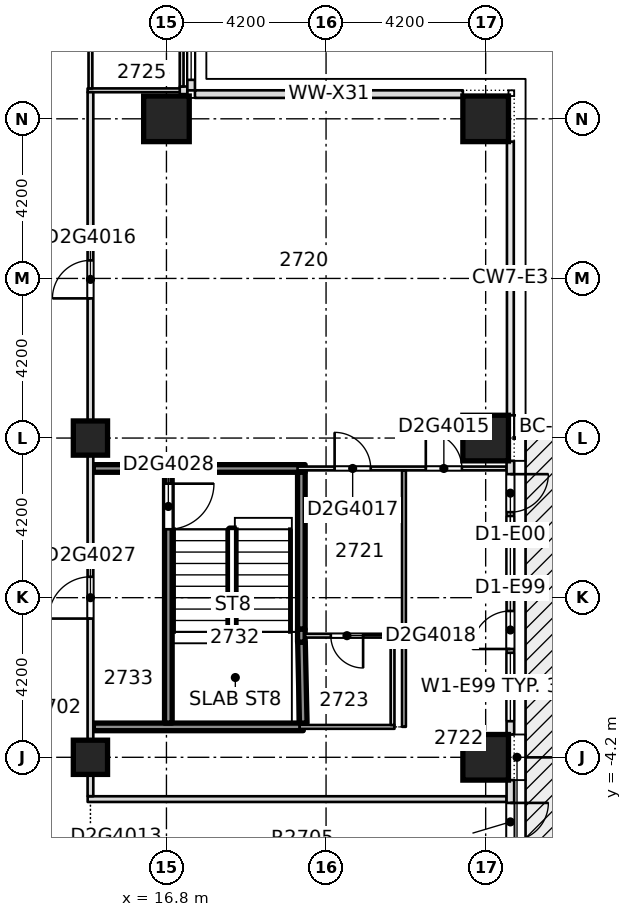
"""IFC4 building model, lengths in metres.
Left out: names, types, materials, properties, quantities, classifications, styles, units other than length and angle.
Written with IfcOpenShell. Run it as: python <this file> out.ifc"""

import sys

from ifc_helpers import new_model, si_unit, direction, frame, frame_2d, origin, origin_2d, place, context, subcontext, project, spatial, rectangle, extrude, element, fill, save


model = new_model("IFC4")
c1 = context("Model", 3, precision=1e-05, world=origin(), true_north=direction((0.0, 1.0)))
c2 = subcontext(c1, "Body", "Model", "MODEL_VIEW")
j1 = project(units=[si_unit("LENGTHUNIT", "METRE"), si_unit("PLANEANGLEUNIT", "RADIAN")], contexts=[c1])
p1 = place(None, origin())
s1 = spatial("IfcSite", under=j1, at=p1, CompositionType="ELEMENT")
p2 = place(p1, origin())
s2 = spatial("IfcBuilding", under=s1, at=p2, CompositionType="ELEMENT")
p3 = place(p2, frame((0.0, 0.0, 108.0)))
s3 = spatial("IfcBuildingStorey", under=s2, at=p3, CompositionType="ELEMENT", Elevation=108.0)
for number, where, z_axis, x_axis in (
    (1, (25.2, -4.2, -0.32), (0.0, 0.0, 1.0), (1.0, 0.0, 0.0)),
    (2, (25.2, 4.2, -0.32), (0.0, 0.0, 1.0), (1.0, 0.0, 0.0)),
    (3, (16.8, 12.6, -0.32), (0.0, 0.0, 1.0), (1.0, 0.0, 0.0)),
    (4, (25.2, 12.6, -0.32), (0.0, 0.0, 1.0), (1.0, 0.0, 0.0)),
):
    element("IfcColumn", number, at=place(p3, frame(where, z_axis=z_axis, x_axis=x_axis)), inside=s3, PredefinedType="COLUMN", context=c2, shape_type="SweptSolid", body=[
        extrude(rectangle(XDim=1.2, YDim=1.2, at=origin_2d()), origin(), (0.0, 0.0, 1.0), 3.45),
    ])
for number, where, z_axis, x_axis in (
    (5, (14.8, -4.2, -0.32), (0.0, 0.0, 1.0), (1.0, 0.0, 0.0)),
    (6, (14.8, 4.2, -0.32), (0.0, 0.0, 1.0), (1.0, 0.0, 0.0)),
):
    element("IfcColumn", number, at=place(p3, frame(where, z_axis=z_axis, x_axis=x_axis)), inside=s3, PredefinedType="COLUMN", context=c2, shape_type="SweptSolid", body=[
        extrude(rectangle(XDim=0.9, YDim=0.9, at=origin_2d()), origin(), (0.0, 0.0, 1.0), 3.45),
    ])
p4 = place(p3, frame((14.727, -5.3, 0.0), z_axis=(0.0, 0.0, 1.0), x_axis=(1.0, 0.0, 0.0)))
e7 = element("IfcWall", 7, at=p4, inside=s3, PredefinedType="PARTITIONING", context=c2, shape_type="SweptSolid", body=[
    extrude(rectangle(XDim=11.023, YDim=0.15, at=frame_2d((5.511, 0.0))), origin(), (0.0, 0.0, 1.0), 3.13),
])
p5 = place(p3, frame((14.877, -3.4, 0.0), z_axis=(0.0, 0.0, 1.0), x_axis=(1.0, 0.0, 0.0)))
e8 = element("IfcWall", 8, at=p5, inside=s3, PredefinedType="SOLIDWALL", context=c2, shape_type="SweptSolid", body=[
    extrude(rectangle(XDim=5.523, YDim=0.2, at=frame_2d((2.761, 0.0))), origin(), (0.0, 0.0, 1.0), 3.13),
])
p6 = place(p3, frame((20.3, -3.4, 0.0), z_axis=(0.0, 0.0, 1.0), x_axis=(1.0, 0.0, 0.0)))
e9 = element("IfcWall", 9, at=p6, inside=s3, PredefinedType="PARTITIONING", context=c2, shape_type="SweptSolid", body=[
    extrude(rectangle(XDim=2.5, YDim=0.1, at=frame_2d((1.25, 0.0))), origin(), (0.0, 0.0, 1.0), 3.13),
])
p7 = place(p3, frame((20.45, -1.0, 0.0), z_axis=(0.0, 0.0, 1.0), x_axis=(1.0, 0.0, 0.0)))
e10 = element("IfcWall", 10, at=p7, inside=s3, PredefinedType="PARTITIONING", context=c2, shape_type="SweptSolid", body=[
    extrude(rectangle(XDim=2.35, YDim=0.1, at=frame_2d((1.175, 0.0))), origin(), (0.0, 0.0, 1.0), 3.13),
])
p8 = place(p7, frame((0.675, 0.0, 0.0)))
e11 = element("IfcOpeningElement", 11, at=p8, cuts=e10, PredefinedType="OPENING", context=c2, shape_type="SweptSolid", body=[
    extrude(rectangle(XDim=0.85, YDim=2.1, at=frame_2d((0.425, 1.05))), frame((0.0, 0.06, 0.0), z_axis=(0.0, -1.0, 0.0), x_axis=(1.0, 0.0, 0.0)), (0.0, 0.0, 1.0), 0.12),
])
p9 = place(p3, frame((14.875, 3.4, 0.0), z_axis=(0.0, 0.0, 1.0), x_axis=(1.0, 0.0, 0.0)))
e12 = element("IfcWall", 12, at=p9, inside=s3, PredefinedType="SOLIDWALL", context=c2, shape_type="SweptSolid", body=[
    extrude(rectangle(XDim=5.575, YDim=0.2, at=frame_2d((2.788, 0.0))), origin(), (0.0, 0.0, 1.0), 3.13),
])
p10 = place(p3, frame((20.25, 3.4, 0.0), z_axis=(0.0, 0.0, 1.0), x_axis=(1.0, 0.0, 0.0)))
e13 = element("IfcWall", 13, at=p10, inside=s3, PredefinedType="PARTITIONING", context=c2, shape_type="SweptSolid", body=[
    extrude(rectangle(XDim=5.5, YDim=0.1, at=frame_2d((2.75, 0.0))), origin(), (0.0, 0.0, 1.0), 3.13),
])
p11 = place(p10, frame((3.375, 0.0, 0.0)))
e14 = element("IfcOpeningElement", 14, at=p11, cuts=e13, PredefinedType="OPENING", context=c2, shape_type="SweptSolid", body=[
    extrude(rectangle(XDim=0.95, YDim=2.1, at=frame_2d((0.475, 1.05))), frame((0.0, 0.06, 0.0), z_axis=(0.0, -1.0, 0.0), x_axis=(1.0, 0.0, 0.0)), (0.0, 0.0, 1.0), 0.12),
])
p12 = place(p10, frame((0.975, 0.0, 0.0)))
e15 = element("IfcOpeningElement", 15, at=p12, cuts=e13, PredefinedType="OPENING", context=c2, shape_type="SweptSolid", body=[
    extrude(rectangle(XDim=0.95, YDim=2.1, at=frame_2d((0.475, 1.05))), frame((0.0, 0.06, 0.0), z_axis=(0.0, -1.0, 0.0), x_axis=(1.0, 0.0, 0.0)), (0.0, 0.0, 1.0), 0.12),
])
p13 = place(p3, frame((14.725, 13.35, 0.0), z_axis=(0.0, 0.0, 1.0), x_axis=(1.0, 0.0, 0.0)))
e16 = element("IfcWall", 16, at=p13, inside=s3, PredefinedType="PARTITIONING", context=c2, shape_type="SweptSolid", body=[
    extrude(rectangle(XDim=2.525, YDim=0.1, at=frame_2d((1.262, 0.0))), origin(), (0.0, 0.0, 1.0), 3.13),
])
p14 = place(p3, frame((17.15, 13.35, 0.0), z_axis=(0.0, 0.0, 1.0), x_axis=(1.0, 0.0, 0.0)))
e17 = element("IfcWall", 17, at=p14, inside=s3, PredefinedType="PARTITIONING", context=c2, shape_type="SweptSolid", body=[
    extrude(rectangle(XDim=0.2, YDim=0.2, at=frame_2d((0.1, 0.0))), origin(), (0.0, 0.0, 1.0), 3.13),
])
p15 = place(p3, frame((14.8, -5.223, 0.0), z_axis=(0.0, 0.0, 1.0), x_axis=(0.0, 1.0, 0.0)))
e18 = element("IfcWall", 18, at=p15, inside=s3, PredefinedType="PARTITIONING", context=c2, shape_type="SweptSolid", body=[
    extrude(rectangle(XDim=18.523, YDim=0.15, at=frame_2d((9.261, 0.0))), origin(), (0.0, 0.0, 1.0), 3.13),
])
p16 = place(p15, frame((13.098, 0.0, 0.0)))
e19 = element("IfcOpeningElement", 19, at=p16, cuts=e18, PredefinedType="OPENING", context=c2, shape_type="SweptSolid", body=[
    extrude(rectangle(XDim=1.0, YDim=2.1, at=frame_2d((0.5, 1.05))), frame((0.0, 0.085, 0.0), z_axis=(0.0, -1.0, 0.0), x_axis=(1.0, 0.0, 0.0)), (0.0, 0.0, 1.0), 0.17),
])
p17 = place(p15, frame((4.673, 0.0, 0.0)))
e20 = element("IfcOpeningElement", 20, at=p17, cuts=e18, PredefinedType="OPENING", context=c2, shape_type="SweptSolid", body=[
    extrude(rectangle(XDim=1.1, YDim=2.1, at=frame_2d((0.55, 1.05))), frame((0.0, 0.085, 0.0), z_axis=(0.0, -1.0, 0.0), x_axis=(1.0, 0.0, 0.0)), (0.0, 0.0, 1.0), 0.17),
])
p18 = place(p3, frame((14.8, 13.4, 0.0), z_axis=(0.0, 0.0, 1.0), x_axis=(0.0, 1.0, 0.0)))
e21 = element("IfcWall", 21, at=p18, inside=s3, PredefinedType="PARTITIONING", context=c2, shape_type="SweptSolid", body=[
    extrude(rectangle(XDim=1.7, YDim=0.1, at=frame_2d((0.85, 0.0))), origin(), (0.0, 0.0, 1.0), 3.13),
])
p19 = place(p3, frame((16.85, -3.3, 0.0), z_axis=(0.0, 0.0, 1.0), x_axis=(0.0, 1.0, 0.0)))
e22 = element("IfcWall", 22, at=p19, inside=s3, PredefinedType="SOLIDWALL", context=c2, shape_type="SweptSolid", body=[
    extrude(rectangle(XDim=6.6, YDim=0.2, at=frame_2d((3.3, 0.0))), origin(), (0.0, 0.0, 1.0), 3.13),
])
p20 = place(p19, frame((5.1, 0.0, 0.0)))
e23 = element("IfcOpeningElement", 23, at=p20, cuts=e22, PredefinedType="OPENING", context=c2, shape_type="SweptSolid", body=[
    extrude(rectangle(XDim=1.2, YDim=2.1, at=frame_2d((0.6, 1.05))), frame((0.0, 0.11, 0.0), z_axis=(0.0, -1.0, 0.0), x_axis=(1.0, 0.0, 0.0)), (0.0, 0.0, 1.0), 0.22),
])
p21 = place(p3, frame((17.2, 13.45, 0.0), z_axis=(0.0, 0.0, 1.0), x_axis=(0.0, 1.0, 0.0)))
e24 = element("IfcWall", 24, at=p21, inside=s3, PredefinedType="PARTITIONING", context=c2, shape_type="SweptSolid", body=[
    extrude(rectangle(XDim=1.65, YDim=0.1, at=frame_2d((0.825, 0.0))), origin(), (0.0, 0.0, 1.0), 3.13),
])
p22 = place(p3, frame((20.4, -3.3, 0.0), z_axis=(0.0, 0.0, 1.0), x_axis=(-0.021771342749, 0.999762976227, 0.0)))
e25 = element("IfcWall", 25, at=p22, inside=s3, PredefinedType="SOLIDWALL", context=c2, shape_type="SweptSolid", body=[
    extrude(rectangle(XDim=2.131, YDim=0.2, at=frame_2d((1.065, 0.0))), origin(), (0.0, 0.0, 1.0), 3.13),
])
p23 = place(p3, frame((20.35, -0.83, 0.0), z_axis=(0.0, 0.0, 1.0), x_axis=(0.0, 1.0, 0.0)))
e26 = element("IfcWall", 26, at=p23, inside=s3, PredefinedType="SOLIDWALL", context=c2, shape_type="SweptSolid", body=[
    extrude(rectangle(XDim=4.13, YDim=0.2, at=frame_2d((2.065, 0.0))), origin(), (0.0, 0.0, 1.0), 3.13),
])
p24 = place(p3, frame((22.75, -3.35, 0.0), z_axis=(0.0, 0.0, 1.0), x_axis=(0.0, 1.0, 0.0)))
e27 = element("IfcWall", 27, at=p24, inside=s3, PredefinedType="PARTITIONING", context=c2, shape_type="SweptSolid", body=[
    extrude(rectangle(XDim=2.3, YDim=0.1, at=frame_2d((1.15, 0.0))), origin(), (0.0, 0.0, 1.0), 3.13),
])
p25 = place(p3, frame((23.05, -3.398, 0.0), z_axis=(0.0, 0.0, 1.0), x_axis=(0.0, 1.0, 0.0)))
e28 = element("IfcWall", 28, at=p25, inside=s3, PredefinedType="PARTITIONING", context=c2, shape_type="SweptSolid", body=[
    extrude(rectangle(XDim=6.748, YDim=0.1, at=frame_2d((3.374, 0.0))), origin(), (0.0, 0.0, 1.0), 3.13),
])
p26 = place(p3, frame((25.85, -12.0, 0.0), z_axis=(0.0, 0.0, 1.0), x_axis=(0.0, 1.0, 0.0)))
e29 = element("IfcWall", 29, at=p26, inside=s3, PredefinedType="STANDARD", context=c2, shape_type="SweptSolid", body=[
    extrude(rectangle(XDim=7.2, YDim=0.2, at=frame_2d((3.6, 0.0))), origin(), (0.0, 0.0, 1.0), 3.13),
])
p27 = place(p26, frame((0.35, 0.0, 0.2)))
e30 = element("IfcOpeningElement", 30, at=p27, cuts=e29, PredefinedType="OPENING", context=c2, shape_type="SweptSolid", body=[
    extrude(rectangle(XDim=1.8, YDim=2.65, at=frame_2d((0.9, 1.325))), frame((0.0, 0.11, 0.0), z_axis=(0.0, -1.0, 0.0), x_axis=(1.0, 0.0, 0.0)), (0.0, 0.0, 1.0), 0.22),
])
p28 = place(p26, frame((2.25, 0.0, 0.0)))
e31 = element("IfcOpeningElement", 31, at=p28, cuts=e29, PredefinedType="OPENING", context=c2, shape_type="SweptSolid", body=[
    extrude(rectangle(XDim=1.0, YDim=2.4, at=frame_2d((0.5, 1.2))), frame((0.0, 0.11, 0.0), z_axis=(0.0, -1.0, 0.0), x_axis=(1.0, 0.0, 0.0)), (0.0, 0.0, 1.0), 0.22),
])
p29 = place(p26, frame((5.6, 0.0, 0.0)))
e32 = element("IfcOpeningElement", 32, at=p29, cuts=e29, PredefinedType="OPENING", context=c2, shape_type="SweptSolid", body=[
    extrude(rectangle(XDim=1.0, YDim=2.4, at=frame_2d((0.5, 1.2))), frame((0.0, 0.11, 0.0), z_axis=(0.0, -1.0, 0.0), x_axis=(1.0, 0.0, 0.0)), (0.0, 0.0, 1.0), 0.22),
])
p30 = place(p3, frame((25.85, -3.6, 0.0), z_axis=(0.0, 0.0, 1.0), x_axis=(0.0, 1.0, 0.0)))
e33 = element("IfcWall", 33, at=p30, inside=s3, PredefinedType="STANDARD", context=c2, shape_type="SweptSolid", body=[
    extrude(rectangle(XDim=7.2, YDim=0.2, at=frame_2d((3.6, 0.0))), origin(), (0.0, 0.0, 1.0), 3.13),
])
p31 = place(p30, frame((0.35, 0.0, 0.2)))
e34 = element("IfcOpeningElement", 34, at=p31, cuts=e33, PredefinedType="OPENING", context=c2, shape_type="SweptSolid", body=[
    extrude(rectangle(XDim=1.8, YDim=2.65, at=frame_2d((0.9, 1.325))), frame((0.0, 0.11, 0.0), z_axis=(0.0, -1.0, 0.0), x_axis=(1.0, 0.0, 0.0)), (0.0, 0.0, 1.0), 0.22),
])
p32 = place(p30, frame((2.25, 0.0, 0.0)))
e35 = element("IfcOpeningElement", 35, at=p32, cuts=e33, PredefinedType="OPENING", context=c2, shape_type="SweptSolid", body=[
    extrude(rectangle(XDim=1.0, YDim=2.4, at=frame_2d((0.5, 1.2))), frame((0.0, 0.11, 0.0), z_axis=(0.0, -1.0, 0.0), x_axis=(1.0, 0.0, 0.0)), (0.0, 0.0, 1.0), 0.22),
])
p33 = place(p30, frame((3.95, 0.0, 0.2)))
e36 = element("IfcOpeningElement", 36, at=p33, cuts=e33, PredefinedType="OPENING", context=c2, shape_type="SweptSolid", body=[
    extrude(rectangle(XDim=1.8, YDim=2.65, at=frame_2d((0.9, 1.325))), frame((0.0, 0.11, 0.0), z_axis=(0.0, -1.0, 0.0), x_axis=(1.0, 0.0, 0.0)), (0.0, 0.0, 1.0), 0.22),
])
p34 = place(p30, frame((5.85, 0.0, 0.0)))
e37 = element("IfcOpeningElement", 37, at=p34, cuts=e33, PredefinedType="OPENING", context=c2, shape_type="SweptSolid", body=[
    extrude(rectangle(XDim=1.0, YDim=2.4, at=frame_2d((0.5, 1.2))), frame((0.0, 0.11, 0.0), z_axis=(0.0, -1.0, 0.0), x_axis=(1.0, 0.0, 0.0)), (0.0, 0.0, 1.0), 0.22),
])
p35 = place(p3, frame((24.6, 13.25, 0.0), z_axis=(0.0, 0.0, 1.0), x_axis=(-1.0, 0.0, 0.0)))
e38 = element("IfcWall", 38, at=p35, inside=s3, PredefinedType="STANDARD", context=c2, shape_type="SweptSolid", body=[
    extrude(rectangle(XDim=7.05, YDim=0.2, at=frame_2d((3.525, 0.0))), origin(), (0.0, 0.0, 1.0), 3.13),
])
p36 = place(p3, frame((17.45, 13.35, 0.0), z_axis=(0.0, 0.0, 1.0), x_axis=(0.0, 1.0, 0.0)))
e39 = element("IfcWall", 39, at=p36, inside=s3, PredefinedType="STANDARD", context=c2, shape_type="SweptSolid", body=[
    extrude(rectangle(XDim=7.05, YDim=0.2, at=frame_2d((3.525, 0.0))), origin(), (0.0, 0.0, 1.0), 3.13),
])
p37 = place(p36, frame((0.275, 0.0, 0.2)))
e40 = element("IfcOpeningElement", 40, at=p37, cuts=e39, PredefinedType="OPENING", context=c2, shape_type="SweptSolid", body=[
    extrude(rectangle(XDim=1.8, YDim=2.65, at=frame_2d((0.9, 1.325))), frame((0.0, 0.11, 0.0), z_axis=(0.0, -1.0, 0.0), x_axis=(1.0, 0.0, 0.0)), (0.0, 0.0, 1.0), 0.22),
])
p38 = place(p36, frame((3.8, 0.0, 0.2)))
e41 = element("IfcOpeningElement", 41, at=p38, cuts=e39, PredefinedType="OPENING", context=c2, shape_type="SweptSolid", body=[
    extrude(rectangle(XDim=1.8, YDim=2.65, at=frame_2d((0.9, 1.325))), frame((0.0, 0.11, 0.0), z_axis=(0.0, -1.0, 0.0), x_axis=(1.0, 0.0, 0.0)), (0.0, 0.0, 1.0), 0.22),
])
p39 = place(p3, frame((20.35, -1.17, 0.0), z_axis=(0.0, 0.0, 1.0), x_axis=(0.0, 1.0, 0.0)))
e42 = element("IfcWall", 42, at=p39, inside=s3, PredefinedType="SOLIDWALL", context=c2, shape_type="SweptSolid", body=[
    extrude(rectangle(XDim=0.34, YDim=0.2, at=frame_2d((0.17, 0.0))), origin(), (0.0, 0.0, 1.0), 3.13),
])
p40 = place(p11, origin())
e43 = element("IfcDoor", 43, at=p40, inside=s3, OperationType="SINGLE_SWING_RIGHT", PredefinedType="DOOR", context=c2, shape_type="SweptSolid", body=[
    extrude(rectangle(XDim=0.95, YDim=2.1, at=frame_2d((0.475, 1.05))), frame((0.0, 0.025, 0.0), z_axis=(0.0, -1.0, 0.0), x_axis=(1.0, 0.0, 0.0)), (0.0, 0.0, 1.0), 0.05),
])
fill(e14, e43)
p41 = place(p16, origin())
e44 = element("IfcDoor", 44, at=p41, inside=s3, OperationType="SINGLE_SWING_RIGHT", PredefinedType="DOOR", context=c2, shape_type="SweptSolid", body=[
    extrude(rectangle(XDim=1.0, YDim=2.1, at=frame_2d((0.5, 1.05))), frame((0.0, 0.025, 0.0), z_axis=(0.0, -1.0, 0.0), x_axis=(1.0, 0.0, 0.0)), (0.0, 0.0, 1.0), 0.05),
])
fill(e19, e44)
p42 = place(p12, origin())
e45 = element("IfcDoor", 45, at=p42, inside=s3, OperationType="SINGLE_SWING_RIGHT", PredefinedType="DOOR", context=c2, shape_type="SweptSolid", body=[
    extrude(rectangle(XDim=0.95, YDim=2.1, at=frame_2d((0.475, 1.05))), frame((0.0, 0.025, 0.0), z_axis=(0.0, -1.0, 0.0), x_axis=(1.0, 0.0, 0.0)), (0.0, 0.0, 1.0), 0.05),
])
fill(e15, e45)
p43 = place(p8, origin())
e46 = element("IfcDoor", 46, at=p43, inside=s3, OperationType="SINGLE_SWING_RIGHT", PredefinedType="DOOR", context=c2, shape_type="SweptSolid", body=[
    extrude(rectangle(XDim=0.85, YDim=2.1, at=frame_2d((0.425, 1.05))), frame((0.0, 0.025, 0.0), z_axis=(0.0, -1.0, 0.0), x_axis=(1.0, 0.0, 0.0)), (0.0, 0.0, 1.0), 0.05),
])
fill(e11, e46)
p44 = place(p17, origin())
e47 = element("IfcDoor", 47, at=p44, inside=s3, OperationType="SINGLE_SWING_RIGHT", PredefinedType="DOOR", context=c2, shape_type="SweptSolid", body=[
    extrude(rectangle(XDim=1.1, YDim=2.1, at=frame_2d((0.55, 1.05))), frame((0.0, 0.025, 0.0), z_axis=(0.0, -1.0, 0.0), x_axis=(1.0, 0.0, 0.0)), (0.0, 0.0, 1.0), 0.05),
])
fill(e20, e47)
p45 = place(p20, origin())
e48 = element("IfcDoor", 48, at=p45, inside=s3, OperationType="SINGLE_SWING_LEFT", PredefinedType="DOOR", context=c2, shape_type="SweptSolid", body=[
    extrude(rectangle(XDim=1.2, YDim=2.1, at=frame_2d((0.6, 1.05))), frame((0.0, 0.025, 0.0), z_axis=(0.0, -1.0, 0.0), x_axis=(1.0, 0.0, 0.0)), (0.0, 0.0, 1.0), 0.05),
])
fill(e23, e48)
p46 = place(p29, origin())
e49 = element("IfcDoor", 49, at=p46, inside=s3, OperationType="SINGLE_SWING_LEFT", PredefinedType="DOOR", context=c2, shape_type="SweptSolid", body=[
    extrude(rectangle(XDim=1.0, YDim=2.4, at=frame_2d((0.5, 1.2))), frame((0.0, 0.025, 0.0), z_axis=(0.0, -1.0, 0.0), x_axis=(1.0, 0.0, 0.0)), (0.0, 0.0, 1.0), 0.05),
])
fill(e32, e49)
p47 = place(p31, origin())
e50 = element("IfcWindow", 50, at=p47, inside=s3, PartitioningType="SINGLE_PANEL", PredefinedType="WINDOW", context=c2, shape_type="SweptSolid", body=[
    extrude(rectangle(XDim=1.8, YDim=2.65, at=frame_2d((0.9, 1.325))), frame((0.0, 0.03, 0.0), z_axis=(0.0, -1.0, 0.0), x_axis=(1.0, 0.0, 0.0)), (0.0, 0.0, 1.0), 0.06),
])
fill(e34, e50)
p48 = place(p32, origin())
e51 = element("IfcDoor", 51, at=p48, inside=s3, OperationType="SINGLE_SWING_LEFT", PredefinedType="DOOR", context=c2, shape_type="SweptSolid", body=[
    extrude(rectangle(XDim=1.0, YDim=2.4, at=frame_2d((0.5, 1.2))), frame((0.0, 0.025, 0.0), z_axis=(0.0, -1.0, 0.0), x_axis=(1.0, 0.0, 0.0)), (0.0, 0.0, 1.0), 0.05),
])
fill(e35, e51)
p49 = place(p33, origin())
e52 = element("IfcWindow", 52, at=p49, inside=s3, PartitioningType="SINGLE_PANEL", PredefinedType="WINDOW", context=c2, shape_type="SweptSolid", body=[
    extrude(rectangle(XDim=1.8, YDim=2.65, at=frame_2d((0.9, 1.325))), frame((0.0, 0.03, 0.0), z_axis=(0.0, -1.0, 0.0), x_axis=(1.0, 0.0, 0.0)), (0.0, 0.0, 1.0), 0.06),
])
fill(e36, e52)
p50 = place(p34, origin())
e53 = element("IfcDoor", 53, at=p50, inside=s3, OperationType="SINGLE_SWING_LEFT", PredefinedType="DOOR", context=c2, shape_type="SweptSolid", body=[
    extrude(rectangle(XDim=1.0, YDim=2.4, at=frame_2d((0.5, 1.2))), frame((0.0, 0.025, 0.0), z_axis=(0.0, -1.0, 0.0), x_axis=(1.0, 0.0, 0.0)), (0.0, 0.0, 1.0), 0.05),
])
fill(e37, e53)
p51 = place(p37, origin())
e54 = element("IfcWindow", 54, at=p51, inside=s3, PartitioningType="SINGLE_PANEL", PredefinedType="WINDOW", context=c2, shape_type="SweptSolid", body=[
    extrude(rectangle(XDim=1.8, YDim=2.65, at=frame_2d((0.9, 1.325))), frame((0.0, 0.03, 0.0), z_axis=(0.0, -1.0, 0.0), x_axis=(1.0, 0.0, 0.0)), (0.0, 0.0, 1.0), 0.06),
])
fill(e40, e54)
save(model, sys.argv[1])
